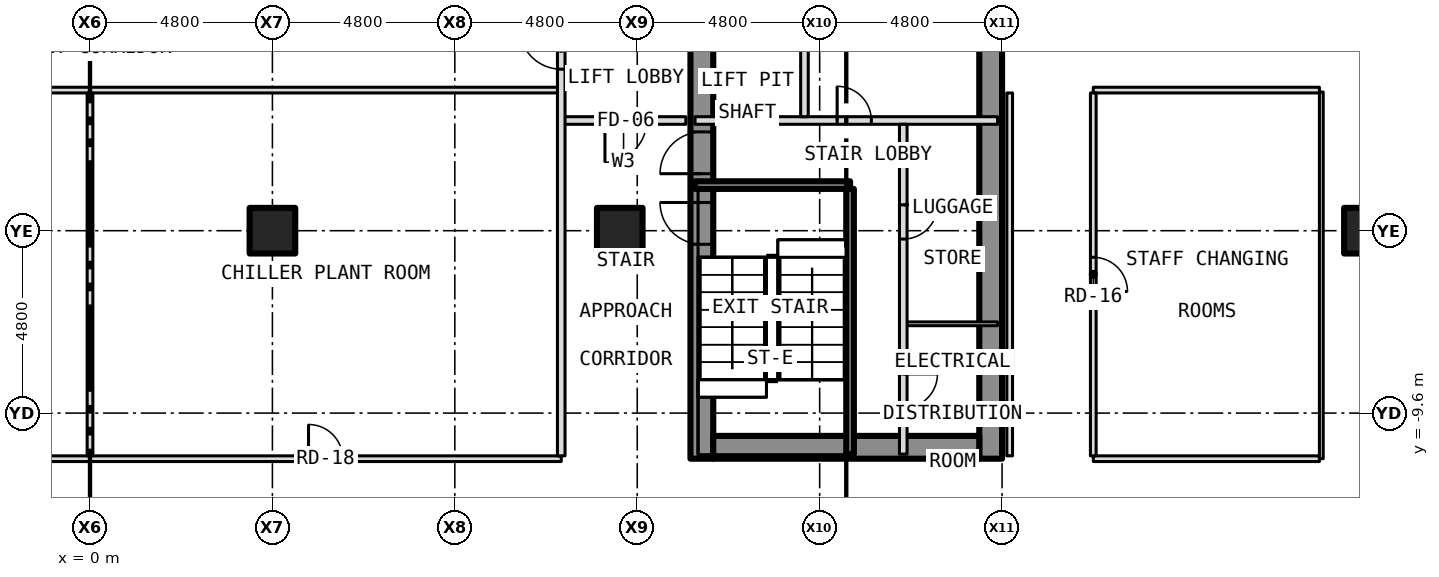
"""IFC4 building model, lengths in metres.
Left out: names, types, materials, properties, quantities, classifications, styles, units other than length and angle.
Written with IfcOpenShell. Run it as: python <this file> out.ifc"""

import sys

from ifc_helpers import new_model, si_unit, direction, frame, frame_2d, origin, origin_2d, place, context, subcontext, project, spatial, rectangle, hollow_rectangle, extrude, element, fill, save


model = new_model("IFC4")
c1 = context("Model", 3, precision=1e-05, world=origin(), true_north=direction((0.0, 1.0)))
c2 = subcontext(c1, "Body", "Model", "MODEL_VIEW")
j1 = project(units=[si_unit("LENGTHUNIT", "METRE"), si_unit("PLANEANGLEUNIT", "RADIAN")], contexts=[c1])
p1 = place(None, origin())
s1 = spatial("IfcSite", under=j1, at=p1, CompositionType="ELEMENT")
p2 = place(p1, origin())
s2 = spatial("IfcBuilding", under=s1, at=p2, CompositionType="ELEMENT")
p3 = place(p2, frame((0.0, 0.0, -5.0)))
s3 = spatial("IfcBuildingStorey", under=s2, at=p3, CompositionType="ELEMENT", Elevation=-5.0)
for number, where, z_axis, x_axis in (
    (1, (33.6, -4.8, -0.3), (0.0, 0.0, 1.0), (1.0, 0.0, 0.0)),
    (2, (4.8, -4.8, -0.3), (0.0, 0.0, 1.0), (1.0, 0.0, 0.0)),
    (3, (13.94, -4.8, -0.3), (0.0, 0.0, 1.0), (1.0, 0.0, 0.0)),
):
    element("IfcColumn", number, at=place(p3, frame(where, z_axis=z_axis, x_axis=x_axis)), inside=s3, PredefinedType="COLUMN", context=c2, shape_type="SweptSolid", body=[
        extrude(hollow_rectangle(XDim=1.2, YDim=1.2, WallThickness=0.07, at=origin_2d()), origin(), (0.0, 0.0, 1.0), 5.0),
    ])
p4 = place(p3, frame((16.1, -10.8, 0.0), z_axis=(0.0, 0.0, 1.0), x_axis=(0.0, 1.0, 0.0)))
e4 = element("IfcWall", 4, at=p4, inside=s3, PredefinedType="SHEAR", context=c2, shape_type="SweptSolid", body=[
    extrude(rectangle(XDim=21.6, YDim=0.6, at=frame_2d((10.8, 0.0))), origin(), (0.0, 0.0, 1.0), 4.7),
])
p5 = place(p4, frame((11.5, 0.0, 0.0)))
e5 = element("IfcOpeningElement", 5, at=p5, cuts=e4, PredefinedType="OPENING", context=c2, shape_type="SweptSolid", body=[
    extrude(rectangle(XDim=1.1, YDim=2.1, at=frame_2d((0.55, 1.05))), frame((0.0, 0.312, 0.0), z_axis=(0.0, -1.0, 0.0), x_axis=(1.0, 0.0, 0.0)), (0.0, 0.0, 1.0), 0.624),
])
p6 = place(p4, frame((5.642, 0.0, 0.0)))
e6 = element("IfcOpeningElement", 6, at=p6, cuts=e4, PredefinedType="OPENING", context=c2, shape_type="SweptSolid", body=[
    extrude(rectangle(XDim=1.1, YDim=2.1, at=frame_2d((0.55, 1.05))), frame((0.0, 0.312, 0.0), z_axis=(0.0, -1.0, 0.0), x_axis=(1.0, 0.0, 0.0)), (0.0, 0.0, 1.0), 0.624),
])
p7 = place(p4, frame((7.5, 0.0, 0.0)))
e7 = element("IfcOpeningElement", 7, at=p7, cuts=e4, PredefinedType="OPENING", context=c2, shape_type="SweptSolid", body=[
    extrude(rectangle(XDim=1.1, YDim=2.1, at=frame_2d((0.55, 1.05))), frame((0.0, 0.312, 0.0), z_axis=(0.0, -1.0, 0.0), x_axis=(1.0, 0.0, 0.0)), (0.0, 0.0, 1.0), 0.624),
])
p8 = place(p3, frame((23.7, -10.8, 0.0), z_axis=(0.0, 0.0, 1.0), x_axis=(0.0, 1.0, 0.0)))
e8 = element("IfcWall", 8, at=p8, inside=s3, PredefinedType="SHEAR", context=c2, shape_type="SweptSolid", body=[
    extrude(rectangle(XDim=21.6, YDim=0.6, at=frame_2d((10.8, 0.0))), origin(), (0.0, 0.0, 1.0), 4.7),
])
p9 = place(p3, frame((16.4, -10.5, 0.0), z_axis=(0.0, 0.0, 1.0), x_axis=(1.0, 0.0, 0.0)))
e9 = element("IfcWall", 9, at=p9, inside=s3, PredefinedType="SHEAR", context=c2, shape_type="SweptSolid", body=[
    extrude(rectangle(XDim=7.0, YDim=0.6, at=frame_2d((3.5, 0.0))), origin(), (0.0, 0.0, 1.0), 4.7),
])
p10 = place(p3, frame((-12.4, -10.8, 0.0), z_axis=(0.0, 0.0, 1.0), x_axis=(1.0, 0.0, 0.0)))
e10 = element("IfcWall", 10, at=p10, inside=s3, PredefinedType="PARTITIONING", context=c2, shape_type="SweptSolid", body=[
    extrude(rectangle(XDim=24.8, YDim=0.15, at=frame_2d((12.4, 0.0))), origin(), (0.0, 0.0, 1.0), 4.7),
])
p11 = place(p10, frame((5.75, 0.0, 0.0)))
e11 = element("IfcOpeningElement", 11, at=p11, cuts=e10, PredefinedType="OPENING", context=c2, shape_type="SweptSolid", body=[
    extrude(rectangle(XDim=0.9, YDim=2.1, at=frame_2d((0.45, 1.05))), frame((0.0, 0.087, 0.0), z_axis=(0.0, -1.0, 0.0), x_axis=(1.0, 0.0, 0.0)), (0.0, 0.0, 1.0), 0.174),
])
p12 = place(p10, frame((18.15, 0.0, 0.0)))
e12 = element("IfcOpeningElement", 12, at=p12, cuts=e10, PredefinedType="OPENING", context=c2, shape_type="SweptSolid", body=[
    extrude(rectangle(XDim=0.9, YDim=2.1, at=frame_2d((0.45, 1.05))), frame((0.0, 0.087, 0.0), z_axis=(0.0, -1.0, 0.0), x_axis=(1.0, 0.0, 0.0)), (0.0, 0.0, 1.0), 0.174),
])
p13 = place(p3, frame((26.4, -10.8, 0.0), z_axis=(0.0, 0.0, 1.0), x_axis=(1.0, 0.0, 0.0)))
e13 = element("IfcWall", 13, at=p13, inside=s3, PredefinedType="PARTITIONING", context=c2, shape_type="SweptSolid", body=[
    extrude(rectangle(XDim=5.95, YDim=0.15, at=frame_2d((2.975, 0.0))), origin(), (0.0, 0.0, 1.0), 4.7),
])
p14 = place(p3, frame((21.4, -7.25, 0.0), z_axis=(0.0, 0.0, 1.0), x_axis=(1.0, 0.0, 0.0)))
e14 = element("IfcWall", 14, at=p14, inside=s3, PredefinedType="PARTITIONING", context=c2, shape_type="SweptSolid", body=[
    extrude(rectangle(XDim=2.48, YDim=0.1, at=frame_2d((1.24, 0.0))), origin(), (0.0, 0.0, 1.0), 4.7),
])
p15 = place(p3, frame((15.92, -3.6, 0.0), z_axis=(0.0, 0.0, 1.0), x_axis=(1.0, 0.0, 0.0)))
e15 = element("IfcWall", 15, at=p15, inside=s3, PredefinedType="SHEAR", context=c2, shape_type="SweptSolid", body=[
    extrude(rectangle(XDim=4.08, YDim=0.2, at=frame_2d((2.04, 0.0))), origin(), (0.0, 0.0, 1.0), 4.7),
])
p16 = place(p3, frame((12.4, -1.9, 0.0), z_axis=(0.0, 0.0, 1.0), x_axis=(1.0, 0.0, 0.0)))
e16 = element("IfcWall", 16, at=p16, inside=s3, PredefinedType="PARTITIONING", context=c2, shape_type="SweptSolid", body=[
    extrude(rectangle(XDim=3.28, YDim=0.2, at=frame_2d((1.64, 0.0))), origin(), (0.0, 0.0, 1.0), 4.7),
])
p17 = place(p16, frame((1.15, 0.0, 0.0)))
e17 = element("IfcOpeningElement", 17, at=p17, cuts=e16, PredefinedType="OPENING", context=c2, shape_type="SweptSolid", body=[
    extrude(rectangle(XDim=1.1, YDim=2.1, at=frame_2d((0.55, 1.05))), frame((0.0, 0.112, 0.0), z_axis=(0.0, -1.0, 0.0), x_axis=(1.0, 0.0, 0.0)), (0.0, 0.0, 1.0), 0.224),
])
p18 = place(p3, frame((15.92, -1.9, 0.0), z_axis=(0.0, 0.0, 1.0), x_axis=(1.0, 0.0, 0.0)))
e18 = element("IfcWall", 18, at=p18, inside=s3, PredefinedType="PARTITIONING", context=c2, shape_type="SweptSolid", body=[
    extrude(rectangle(XDim=7.96, YDim=0.2, at=frame_2d((3.98, 0.0))), origin(), (0.0, 0.0, 1.0), 4.7),
])
p19 = place(p18, frame((3.74, 0.0, 0.0)))
e19 = element("IfcOpeningElement", 19, at=p19, cuts=e18, PredefinedType="OPENING", context=c2, shape_type="SweptSolid", body=[
    extrude(rectangle(XDim=0.9, YDim=2.1, at=frame_2d((0.45, 1.05))), frame((0.0, 0.112, 0.0), z_axis=(0.0, -1.0, 0.0), x_axis=(1.0, 0.0, 0.0)), (0.0, 0.0, 1.0), 0.224),
])
p20 = place(p3, frame((-12.4, -1.1, 0.0), z_axis=(0.0, 0.0, 1.0), x_axis=(1.0, 0.0, 0.0)))
e20 = element("IfcWall", 20, at=p20, inside=s3, PredefinedType="PARTITIONING", context=c2, shape_type="SweptSolid", body=[
    extrude(rectangle(XDim=24.8, YDim=0.15, at=frame_2d((12.4, 0.0))), origin(), (0.0, 0.0, 1.0), 4.7),
])
p21 = place(p3, frame((26.4, -1.1, 0.0), z_axis=(0.0, 0.0, 1.0), x_axis=(1.0, 0.0, 0.0)))
e21 = element("IfcWall", 21, at=p21, inside=s3, PredefinedType="PARTITIONING", context=c2, shape_type="SweptSolid", body=[
    extrude(rectangle(XDim=5.95, YDim=0.15, at=frame_2d((2.975, 0.0))), origin(), (0.0, 0.0, 1.0), 4.7),
])
p22 = place(p3, frame((0.0, -10.725, 0.0), z_axis=(0.0, 0.0, 1.0), x_axis=(0.0, 1.0, 0.0)))
e22 = element("IfcWall", 22, at=p22, inside=s3, PredefinedType="PARTITIONING", context=c2, shape_type="SweptSolid", body=[
    extrude(rectangle(XDim=5.771, YDim=0.15, at=frame_2d((2.885, 0.0))), origin(), (0.0, 0.0, 1.0), 4.083),
])
p23 = place(p3, frame((0.0, -4.954, 0.0), z_axis=(0.0, 0.0, 1.0), x_axis=(0.0, 1.0, 0.0)))
e23 = element("IfcWall", 23, at=p23, inside=s3, PredefinedType="PARTITIONING", context=c2, shape_type="SweptSolid", body=[
    extrude(rectangle(XDim=0.308, YDim=0.15, at=frame_2d((0.154, 0.0))), origin(), (0.0, 0.0, 1.0), 4.7),
])
p24 = place(p3, frame((0.0, -4.646, 0.0), z_axis=(0.0, 0.0, 1.0), x_axis=(0.0, 1.0, 0.0)))
e24 = element("IfcWall", 24, at=p24, inside=s3, PredefinedType="PARTITIONING", context=c2, shape_type="SweptSolid", body=[
    extrude(rectangle(XDim=3.471, YDim=0.15, at=frame_2d((1.735, 0.0))), origin(), (0.0, 0.0, 1.0), 4.083),
])
p25 = place(p3, frame((12.4, -10.725, 0.0), z_axis=(0.0, 0.0, 1.0), x_axis=(0.0, 1.0, 0.0)))
e25 = element("IfcWall", 25, at=p25, inside=s3, PredefinedType="PARTITIONING", context=c2, shape_type="SweptSolid", body=[
    extrude(rectangle(XDim=22.975, YDim=0.2, at=frame_2d((11.488, 0.0))), origin(), (0.0, 0.0, 1.0), 4.7),
])
p26 = place(p25, frame((10.175, 0.0, 0.0)))
e26 = element("IfcOpeningElement", 26, at=p26, cuts=e25, PredefinedType="OPENING", context=c2, shape_type="SweptSolid", body=[
    extrude(rectangle(XDim=1.1, YDim=2.1, at=frame_2d((0.55, 1.05))), frame((0.0, 0.112, 0.0), z_axis=(0.0, -1.0, 0.0), x_axis=(1.0, 0.0, 0.0)), (0.0, 0.0, 1.0), 0.224),
])
p27 = place(p3, frame((18.8, -1.8, 0.0), z_axis=(0.0, 0.0, 1.0), x_axis=(0.0, 1.0, 0.0)))
e27 = element("IfcWall", 27, at=p27, inside=s3, PredefinedType="PARTITIONING", context=c2, shape_type="SweptSolid", body=[
    extrude(rectangle(XDim=12.48, YDim=0.2, at=frame_2d((6.24, 0.0))), origin(), (0.0, 0.0, 1.0), 4.7),
])
p28 = place(p3, frame((20.0, -10.68, 0.0), z_axis=(0.0, 0.0, 1.0), x_axis=(0.0, 1.0, 0.0)))
e28 = element("IfcWall", 28, at=p28, inside=s3, PredefinedType="SHEAR", context=c2, shape_type="SweptSolid", body=[
    extrude(rectangle(XDim=6.98, YDim=0.2, at=frame_2d((3.49, 0.0))), origin(), (0.0, 0.0, 1.0), 4.7),
])
p29 = place(p3, frame((21.4, -10.68, 0.0), z_axis=(0.0, 0.0, 1.0), x_axis=(0.0, 1.0, 0.0)))
e29 = element("IfcWall", 29, at=p29, inside=s3, PredefinedType="PARTITIONING", context=c2, shape_type="SweptSolid", body=[
    extrude(rectangle(XDim=8.68, YDim=0.2, at=frame_2d((4.34, 0.0))), origin(), (0.0, 0.0, 1.0), 4.7),
])
p30 = place(p29, frame((1.21, 0.0, 0.0)))
e30 = element("IfcOpeningElement", 30, at=p30, cuts=e29, PredefinedType="OPENING", context=c2, shape_type="SweptSolid", body=[
    extrude(rectangle(XDim=0.9, YDim=2.1, at=frame_2d((0.45, 1.05))), frame((0.0, 0.112, 0.0), z_axis=(0.0, -1.0, 0.0), x_axis=(1.0, 0.0, 0.0)), (0.0, 0.0, 1.0), 0.224),
])
p31 = place(p29, frame((5.66, 0.0, 0.0)))
e31 = element("IfcOpeningElement", 31, at=p31, cuts=e29, PredefinedType="OPENING", context=c2, shape_type="SweptSolid", body=[
    extrude(rectangle(XDim=0.9, YDim=2.1, at=frame_2d((0.45, 1.05))), frame((0.0, 0.112, 0.0), z_axis=(0.0, -1.0, 0.0), x_axis=(1.0, 0.0, 0.0)), (0.0, 0.0, 1.0), 0.224),
])
p32 = place(p3, frame((24.2, -10.725, 0.0), z_axis=(0.0, 0.0, 1.0), x_axis=(0.0, 1.0, 0.0)))
e32 = element("IfcWall", 32, at=p32, inside=s3, PredefinedType="PARTITIONING", context=c2, shape_type="SweptSolid", body=[
    extrude(rectangle(XDim=9.55, YDim=0.15, at=frame_2d((4.775, 0.0))), origin(), (0.0, 0.0, 1.0), 4.7),
])
p33 = place(p3, frame((26.4, -10.725, 0.0), z_axis=(0.0, 0.0, 1.0), x_axis=(0.0, 1.0, 0.0)))
e33 = element("IfcWall", 33, at=p33, inside=s3, PredefinedType="PARTITIONING", context=c2, shape_type="SweptSolid", body=[
    extrude(rectangle(XDim=9.55, YDim=0.15, at=frame_2d((4.775, 0.0))), origin(), (0.0, 0.0, 1.0), 4.7),
])
p34 = place(p33, frame((4.325, 0.0, 0.0)))
e34 = element("IfcOpeningElement", 34, at=p34, cuts=e33, PredefinedType="OPENING", context=c2, shape_type="SweptSolid", body=[
    extrude(rectangle(XDim=0.9, YDim=2.1, at=frame_2d((0.45, 1.05))), frame((0.0, 0.087, 0.0), z_axis=(0.0, -1.0, 0.0), x_axis=(1.0, 0.0, 0.0)), (0.0, 0.0, 1.0), 0.174),
])
p35 = place(p3, frame((32.4, -10.8, 0.0), z_axis=(0.0, 0.0, 1.0), x_axis=(0.0, 1.0, 0.0)))
e35 = element("IfcWall", 35, at=p35, inside=s3, PredefinedType="PARTITIONING", context=c2, shape_type="SweptSolid", body=[
    extrude(rectangle(XDim=9.65, YDim=0.1, at=frame_2d((4.825, 0.0))), origin(), (0.0, 0.0, 1.0), 4.7),
])
p36 = place(p6, origin())
e36 = element("IfcDoor", 36, at=p36, inside=s3, OperationType="SINGLE_SWING_RIGHT", PredefinedType="DOOR", context=c2, shape_type="SweptSolid", body=[
    extrude(rectangle(XDim=1.1, YDim=2.1, at=frame_2d((0.55, 1.05))), frame((0.0, 0.025, 0.0), z_axis=(0.0, -1.0, 0.0), x_axis=(1.0, 0.0, 0.0)), (0.0, 0.0, 1.0), 0.05),
])
fill(e6, e36)
p37 = place(p7, origin())
e37 = element("IfcDoor", 37, at=p37, inside=s3, OperationType="SINGLE_SWING_LEFT", PredefinedType="DOOR", context=c2, shape_type="SweptSolid", body=[
    extrude(rectangle(XDim=1.1, YDim=2.1, at=frame_2d((0.55, 1.05))), frame((0.0, 0.025, 0.0), z_axis=(0.0, -1.0, 0.0), x_axis=(1.0, 0.0, 0.0)), (0.0, 0.0, 1.0), 0.05),
])
fill(e7, e37)
p38 = place(p30, origin())
e38 = element("IfcDoor", 38, at=p38, inside=s3, OperationType="SINGLE_SWING_RIGHT", PredefinedType="DOOR", context=c2, shape_type="SweptSolid", body=[
    extrude(rectangle(XDim=0.9, YDim=2.1, at=frame_2d((0.45, 1.05))), frame((0.0, 0.025, 0.0), z_axis=(0.0, -1.0, 0.0), x_axis=(1.0, 0.0, 0.0)), (0.0, 0.0, 1.0), 0.05),
])
fill(e30, e38)
p39 = place(p31, origin())
e39 = element("IfcDoor", 39, at=p39, inside=s3, OperationType="SINGLE_SWING_RIGHT", PredefinedType="DOOR", context=c2, shape_type="SweptSolid", body=[
    extrude(rectangle(XDim=0.9, YDim=2.1, at=frame_2d((0.45, 1.05))), frame((0.0, 0.025, 0.0), z_axis=(0.0, -1.0, 0.0), x_axis=(1.0, 0.0, 0.0)), (0.0, 0.0, 1.0), 0.05),
])
fill(e31, e39)
p40 = place(p19, origin())
e40 = element("IfcDoor", 40, at=p40, inside=s3, OperationType="SINGLE_SWING_LEFT", PredefinedType="DOOR", context=c2, shape_type="SweptSolid", body=[
    extrude(rectangle(XDim=0.9, YDim=2.1, at=frame_2d((0.45, 1.05))), frame((0.0, 0.025, 0.0), z_axis=(0.0, -1.0, 0.0), x_axis=(1.0, 0.0, 0.0)), (0.0, 0.0, 1.0), 0.05),
])
fill(e19, e40)
p41 = place(p17, origin())
e41 = element("IfcDoor", 41, at=p41, inside=s3, OperationType="SINGLE_SWING_LEFT", PredefinedType="DOOR", context=c2, shape_type="SweptSolid", body=[
    extrude(rectangle(XDim=1.1, YDim=2.1, at=frame_2d((0.55, 1.05))), frame((0.0, 0.025, 0.0), z_axis=(0.0, -1.0, 0.0), x_axis=(1.0, 0.0, 0.0)), (0.0, 0.0, 1.0), 0.05),
])
fill(e17, e41)
p42 = place(p26, origin())
e42 = element("IfcDoor", 42, at=p42, inside=s3, OperationType="SINGLE_SWING_RIGHT", PredefinedType="DOOR", context=c2, shape_type="SweptSolid", body=[
    extrude(rectangle(XDim=1.1, YDim=2.1, at=frame_2d((0.55, 1.05))), frame((0.0, 0.025, 0.0), z_axis=(0.0, -1.0, 0.0), x_axis=(1.0, 0.0, 0.0)), (0.0, 0.0, 1.0), 0.05),
])
fill(e26, e42)
p43 = place(p34, origin())
e43 = element("IfcDoor", 43, at=p43, inside=s3, OperationType="SINGLE_SWING_LEFT", PredefinedType="DOOR", context=c2, shape_type="SweptSolid", body=[
    extrude(rectangle(XDim=0.9, YDim=2.1, at=frame_2d((0.45, 1.05))), frame((0.0, 0.025, 0.0), z_axis=(0.0, -1.0, 0.0), x_axis=(1.0, 0.0, 0.0)), (0.0, 0.0, 1.0), 0.05),
])
fill(e34, e43)
p44 = place(p12, origin())
e44 = element("IfcDoor", 44, at=p44, inside=s3, OperationType="SINGLE_SWING_LEFT", PredefinedType="DOOR", context=c2, shape_type="SweptSolid", body=[
    extrude(rectangle(XDim=0.9, YDim=2.1, at=frame_2d((0.45, 1.05))), frame((0.0, 0.025, 0.0), z_axis=(0.0, -1.0, 0.0), x_axis=(1.0, 0.0, 0.0)), (0.0, 0.0, 1.0), 0.05),
])
fill(e12, e44)
save(model, sys.argv[1])
